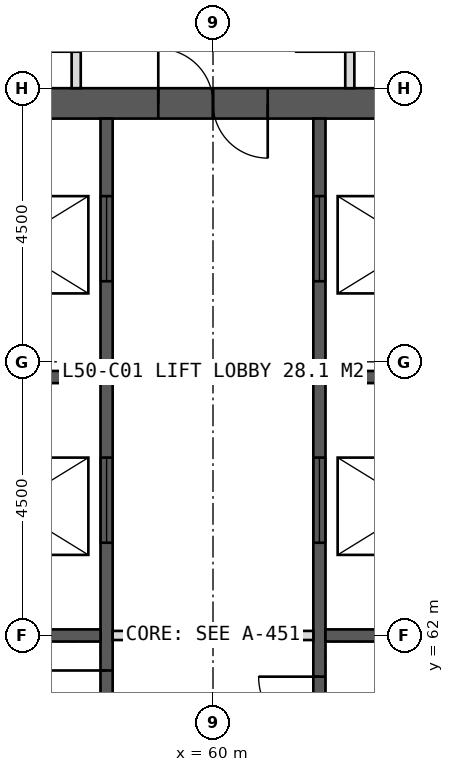
"""IFC4 building model, lengths in metres.
Left out: names, types, materials, properties, quantities, classifications, styles, units other than length and angle.
Written with IfcOpenShell. Run it as: python <this file> out.ifc"""

import sys

from ifc_helpers import new_model, si_unit, direction, frame, frame_2d, origin, place, context, subcontext, project, spatial, rectangle, extrude, element, fill, save


model = new_model("IFC4")
c1 = context("Model", 3, precision=1e-05, world=origin(), true_north=direction((0.0, 1.0)))
c2 = subcontext(c1, "Body", "Model", "MODEL_VIEW")
j1 = project(units=[si_unit("LENGTHUNIT", "METRE"), si_unit("PLANEANGLEUNIT", "RADIAN")], contexts=[c1])
p1 = place(None, origin())
s1 = spatial("IfcSite", under=j1, at=p1, CompositionType="ELEMENT")
p2 = place(p1, origin())
s2 = spatial("IfcBuilding", under=s1, at=p2, CompositionType="ELEMENT")
p3 = place(p2, frame((0.0, 0.0, 209.0)))
s3 = spatial("IfcBuildingStorey", under=s2, at=p3, CompositionType="ELEMENT", Elevation=209.0)
p4 = place(p3, frame((51.0, 70.75, 0.0), z_axis=(0.0, 0.0, 1.0), x_axis=(1.0, 0.0, 0.0)))
e1 = element("IfcWall", 1, at=p4, inside=s3, PredefinedType="SHEAR", context=c2, shape_type="SweptSolid", body=[
    extrude(rectangle(XDim=18.0, YDim=0.5, at=frame_2d((9.0, 0.0))), origin(), (0.0, 0.0, 1.0), 4.0),
])
p5 = place(p4, frame((8.1, 0.0, 0.0)))
e2 = element("IfcOpeningElement", 2, at=p5, cuts=e1, PredefinedType="OPENING", context=c2, shape_type="SweptSolid", body=[
    extrude(rectangle(XDim=1.8, YDim=2.2, at=frame_2d((0.9, 1.1))), frame((0.0, 0.26, 0.0), z_axis=(0.0, -1.0, 0.0), x_axis=(1.0, 0.0, 0.0)), (0.0, 0.0, 1.0), 0.52),
])
p6 = place(p3, frame((58.25, 53.5, 0.0), z_axis=(0.0, 0.0, 1.0), x_axis=(0.0, 1.0, 0.0)))
e3 = element("IfcWall", 3, at=p6, inside=s3, PredefinedType="SHEAR", context=c2, shape_type="SweptSolid", body=[
    extrude(rectangle(XDim=17.0, YDim=0.2, at=frame_2d((8.5, 0.0))), origin(), (0.0, 0.0, 1.0), 4.0),
])
p7 = place(p6, frame((0.6, 0.0, 0.0)))
e4 = element("IfcOpeningElement", 4, at=p7, cuts=e3, PredefinedType="OPENING", context=c2, shape_type="SweptSolid", body=[
    extrude(rectangle(XDim=1.0, YDim=2.1, at=frame_2d((0.5, 1.05))), frame((0.0, 0.11, 0.0), z_axis=(0.0, -1.0, 0.0), x_axis=(1.0, 0.0, 0.0)), (0.0, 0.0, 1.0), 0.22),
])
p8 = place(p6, frame((2.75, 0.0, 0.0)))
e5 = element("IfcOpeningElement", 5, at=p8, cuts=e3, PredefinedType="OPENING", context=c2, shape_type="SweptSolid", body=[
    extrude(rectangle(XDim=1.0, YDim=2.1, at=frame_2d((0.5, 1.05))), frame((0.0, 0.11, 0.0), z_axis=(0.0, -1.0, 0.0), x_axis=(1.0, 0.0, 0.0)), (0.0, 0.0, 1.0), 0.22),
])
p9 = place(p6, frame((4.824, 0.0, 0.0)))
e6 = element("IfcOpeningElement", 6, at=p9, cuts=e3, PredefinedType="OPENING", context=c2, shape_type="SweptSolid", body=[
    extrude(rectangle(XDim=1.0, YDim=2.1, at=frame_2d((0.5, 1.05))), frame((0.0, 0.11, 0.0), z_axis=(0.0, -1.0, 0.0), x_axis=(1.0, 0.0, 0.0)), (0.0, 0.0, 1.0), 0.22),
])
p10 = place(p6, frame((6.924, 0.0, 0.0)))
e7 = element("IfcOpeningElement", 7, at=p10, cuts=e3, PredefinedType="OPENING", context=c2, shape_type="SweptSolid", body=[
    extrude(rectangle(XDim=1.0, YDim=2.1, at=frame_2d((0.5, 1.05))), frame((0.0, 0.11, 0.0), z_axis=(0.0, -1.0, 0.0), x_axis=(1.0, 0.0, 0.0)), (0.0, 0.0, 1.0), 0.22),
])
p11 = place(p6, frame((10.025, 0.0, 0.0)))
e8 = element("IfcOpeningElement", 8, at=p11, cuts=e3, PredefinedType="OPENING", context=c2, shape_type="SweptSolid", body=[
    extrude(rectangle(XDim=1.4, YDim=2.2, at=frame_2d((0.7, 1.1))), frame((0.0, 0.11, 0.0), z_axis=(0.0, -1.0, 0.0), x_axis=(1.0, 0.0, 0.0)), (0.0, 0.0, 1.0), 0.22),
])
p12 = place(p6, frame((14.325, 0.0, 0.0)))
e9 = element("IfcOpeningElement", 9, at=p12, cuts=e3, PredefinedType="OPENING", context=c2, shape_type="SweptSolid", body=[
    extrude(rectangle(XDim=1.4, YDim=2.2, at=frame_2d((0.7, 1.1))), frame((0.0, 0.11, 0.0), z_axis=(0.0, -1.0, 0.0), x_axis=(1.0, 0.0, 0.0)), (0.0, 0.0, 1.0), 0.22),
])
p13 = place(p3, frame((61.75, 53.5, 0.0), z_axis=(0.0, 0.0, 1.0), x_axis=(0.0, 1.0, 0.0)))
e10 = element("IfcWall", 10, at=p13, inside=s3, PredefinedType="SHEAR", context=c2, shape_type="SweptSolid", body=[
    extrude(rectangle(XDim=17.0, YDim=0.2, at=frame_2d((8.5, 0.0))), origin(), (0.0, 0.0, 1.0), 4.0),
])
p14 = place(p13, frame((0.808, 0.0, 0.0)))
e11 = element("IfcOpeningElement", 11, at=p14, cuts=e10, PredefinedType="OPENING", context=c2, shape_type="SweptSolid", body=[
    extrude(rectangle(XDim=1.0, YDim=2.1, at=frame_2d((0.5, 1.05))), frame((0.0, 0.11, 0.0), z_axis=(0.0, -1.0, 0.0), x_axis=(1.0, 0.0, 0.0)), (0.0, 0.0, 1.0), 0.22),
])
p15 = place(p13, frame((2.958, 0.0, 0.0)))
e12 = element("IfcOpeningElement", 12, at=p15, cuts=e10, PredefinedType="OPENING", context=c2, shape_type="SweptSolid", body=[
    extrude(rectangle(XDim=1.0, YDim=2.1, at=frame_2d((0.5, 1.05))), frame((0.0, 0.11, 0.0), z_axis=(0.0, -1.0, 0.0), x_axis=(1.0, 0.0, 0.0)), (0.0, 0.0, 1.0), 0.22),
])
p16 = place(p13, frame((4.722, 0.0, 0.0)))
e13 = element("IfcOpeningElement", 13, at=p16, cuts=e10, PredefinedType="OPENING", context=c2, shape_type="SweptSolid", body=[
    extrude(rectangle(XDim=1.0, YDim=2.1, at=frame_2d((0.5, 1.05))), frame((0.0, 0.11, 0.0), z_axis=(0.0, -1.0, 0.0), x_axis=(1.0, 0.0, 0.0)), (0.0, 0.0, 1.0), 0.22),
])
p17 = place(p13, frame((6.823, 0.0, 0.0)))
e14 = element("IfcOpeningElement", 14, at=p17, cuts=e10, PredefinedType="OPENING", context=c2, shape_type="SweptSolid", body=[
    extrude(rectangle(XDim=1.0, YDim=2.1, at=frame_2d((0.5, 1.05))), frame((0.0, 0.11, 0.0), z_axis=(0.0, -1.0, 0.0), x_axis=(1.0, 0.0, 0.0)), (0.0, 0.0, 1.0), 0.22),
])
p18 = place(p13, frame((10.025, 0.0, 0.0)))
e15 = element("IfcOpeningElement", 15, at=p18, cuts=e10, PredefinedType="OPENING", context=c2, shape_type="SweptSolid", body=[
    extrude(rectangle(XDim=1.4, YDim=2.2, at=frame_2d((0.7, 1.1))), frame((0.0, 0.11, 0.0), z_axis=(0.0, -1.0, 0.0), x_axis=(1.0, 0.0, 0.0)), (0.0, 0.0, 1.0), 0.22),
])
p19 = place(p13, frame((14.325, 0.0, 0.0)))
e16 = element("IfcOpeningElement", 16, at=p19, cuts=e10, PredefinedType="OPENING", context=c2, shape_type="SweptSolid", body=[
    extrude(rectangle(XDim=1.4, YDim=2.2, at=frame_2d((0.7, 1.1))), frame((0.0, 0.11, 0.0), z_axis=(0.0, -1.0, 0.0), x_axis=(1.0, 0.0, 0.0)), (0.0, 0.0, 1.0), 0.22),
])
for number, where, z_axis, x_axis in (
    (17, (55.1, 62.0, 0.0), (0.0, 0.0, 1.0), (1.0, 0.0, 0.0)),
    (18, (61.85, 62.0, 0.0), (0.0, 0.0, 1.0), (1.0, 0.0, 0.0)),
    (19, (55.1, 66.25, 0.0), (0.0, 0.0, 1.0), (1.0, 0.0, 0.0)),
    (20, (61.85, 66.25, 0.0), (0.0, 0.0, 1.0), (1.0, 0.0, 0.0)),
):
    element("IfcWall", number, at=place(p3, frame(where, z_axis=z_axis, x_axis=x_axis)), inside=s3, PredefinedType="SHEAR", context=c2, shape_type="SweptSolid", body=[
        extrude(rectangle(XDim=3.05, YDim=0.2, at=frame_2d((1.525, 0.0))), origin(), (0.0, 0.0, 1.0), 4.0),
    ])
p20 = place(p3, frame((57.75, 71.0, 0.0), z_axis=(0.0, 0.0, 1.0), x_axis=(0.0, 1.0, 0.0)))
e21 = element("IfcWall", 21, at=p20, inside=s3, PredefinedType="PARTITIONING", context=c2, shape_type="SweptSolid", body=[
    extrude(rectangle(XDim=3.9, YDim=0.15, at=frame_2d((1.95, 0.0))), origin(), (0.0, 0.0, 1.0), 3.75),
])
p21 = place(p20, frame((0.6, 0.0, 0.0)))
e22 = element("IfcOpeningElement", 22, at=p21, cuts=e21, PredefinedType="OPENING", context=c2, shape_type="SweptSolid", body=[
    extrude(rectangle(XDim=0.9, YDim=2.1, at=frame_2d((0.45, 1.05))), frame((0.0, 0.085, 0.0), z_axis=(0.0, -1.0, 0.0), x_axis=(1.0, 0.0, 0.0)), (0.0, 0.0, 1.0), 0.17),
])
p22 = place(p3, frame((62.25, 71.0, 0.0), z_axis=(0.0, 0.0, 1.0), x_axis=(0.0, 1.0, 0.0)))
e23 = element("IfcWall", 23, at=p22, inside=s3, PredefinedType="PARTITIONING", context=c2, shape_type="SweptSolid", body=[
    extrude(rectangle(XDim=3.9, YDim=0.15, at=frame_2d((1.95, 0.0))), origin(), (0.0, 0.0, 1.0), 3.75),
])
p23 = place(p22, frame((0.6, 0.0, 0.0)))
e24 = element("IfcOpeningElement", 24, at=p23, cuts=e23, PredefinedType="OPENING", context=c2, shape_type="SweptSolid", body=[
    extrude(rectangle(XDim=0.9, YDim=2.1, at=frame_2d((0.45, 1.05))), frame((0.0, 0.085, 0.0), z_axis=(0.0, -1.0, 0.0), x_axis=(1.0, 0.0, 0.0)), (0.0, 0.0, 1.0), 0.17),
])
p24 = place(p3, frame((58.35, 62.0, 0.0), z_axis=(0.0, 0.0, 1.0), x_axis=(1.0, 0.0, 0.0)))
e25 = element("IfcWall", 25, at=p24, inside=s3, PredefinedType="PARTITIONING", context=c2, shape_type="SweptSolid", body=[
    extrude(rectangle(XDim=3.3, YDim=0.15, at=frame_2d((1.65, 0.0))), origin(), (0.0, 0.0, 1.0), 3.75),
])
p25 = place(p5, origin())
e26 = element("IfcDoor", 26, at=p25, inside=s3, OperationType="DOUBLE_DOOR_SINGLE_SWING", PredefinedType="DOOR", context=c2, shape_type="SweptSolid", body=[
    extrude(rectangle(XDim=1.8, YDim=2.2, at=frame_2d((0.9, 1.1))), frame((0.0, 0.025, 0.0), z_axis=(0.0, -1.0, 0.0), x_axis=(1.0, 0.0, 0.0)), (0.0, 0.0, 1.0), 0.05),
])
fill(e2, e26)
p26 = place(p10, origin())
e27 = element("IfcDoor", 27, at=p26, inside=s3, OperationType="SINGLE_SWING_RIGHT", PredefinedType="DOOR", context=c2, shape_type="SweptSolid", body=[
    extrude(rectangle(XDim=1.0, YDim=2.1, at=frame_2d((0.5, 1.05))), frame((0.0, 0.025, 0.0), z_axis=(0.0, -1.0, 0.0), x_axis=(1.0, 0.0, 0.0)), (0.0, 0.0, 1.0), 0.05),
])
fill(e7, e27)
p27 = place(p17, origin())
e28 = element("IfcDoor", 28, at=p27, inside=s3, OperationType="SINGLE_SWING_RIGHT", PredefinedType="DOOR", context=c2, shape_type="SweptSolid", body=[
    extrude(rectangle(XDim=1.0, YDim=2.1, at=frame_2d((0.5, 1.05))), frame((0.0, 0.025, 0.0), z_axis=(0.0, -1.0, 0.0), x_axis=(1.0, 0.0, 0.0)), (0.0, 0.0, 1.0), 0.05),
])
fill(e14, e28)
p28 = place(p11, origin())
e29 = element("IfcDoor", 29, at=p28, inside=s3, OperationType="SLIDING_TO_LEFT", PredefinedType="DOOR", context=c2, shape_type="SweptSolid", body=[
    extrude(rectangle(XDim=1.4, YDim=2.2, at=frame_2d((0.7, 1.1))), frame((0.0, 0.025, 0.0), z_axis=(0.0, -1.0, 0.0), x_axis=(1.0, 0.0, 0.0)), (0.0, 0.0, 1.0), 0.05),
])
fill(e8, e29)
p29 = place(p18, origin())
e30 = element("IfcDoor", 30, at=p29, inside=s3, OperationType="SLIDING_TO_LEFT", PredefinedType="DOOR", context=c2, shape_type="SweptSolid", body=[
    extrude(rectangle(XDim=1.4, YDim=2.2, at=frame_2d((0.7, 1.1))), frame((0.0, 0.025, 0.0), z_axis=(0.0, -1.0, 0.0), x_axis=(1.0, 0.0, 0.0)), (0.0, 0.0, 1.0), 0.05),
])
fill(e15, e30)
p30 = place(p12, origin())
e31 = element("IfcDoor", 31, at=p30, inside=s3, OperationType="SLIDING_TO_LEFT", PredefinedType="DOOR", context=c2, shape_type="SweptSolid", body=[
    extrude(rectangle(XDim=1.4, YDim=2.2, at=frame_2d((0.7, 1.1))), frame((0.0, 0.025, 0.0), z_axis=(0.0, -1.0, 0.0), x_axis=(1.0, 0.0, 0.0)), (0.0, 0.0, 1.0), 0.05),
])
fill(e9, e31)
p31 = place(p19, origin())
e32 = element("IfcDoor", 32, at=p31, inside=s3, OperationType="SLIDING_TO_LEFT", PredefinedType="DOOR", context=c2, shape_type="SweptSolid", body=[
    extrude(rectangle(XDim=1.4, YDim=2.2, at=frame_2d((0.7, 1.1))), frame((0.0, 0.025, 0.0), z_axis=(0.0, -1.0, 0.0), x_axis=(1.0, 0.0, 0.0)), (0.0, 0.0, 1.0), 0.05),
])
fill(e16, e32)
save(model, sys.argv[1])
